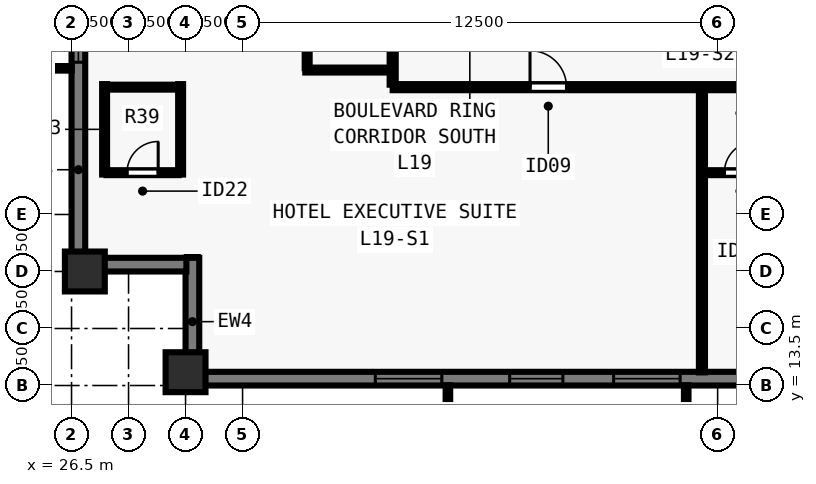
"""IFC4 building model, lengths in metres.
Left out: names, types, materials, properties, quantities, classifications, styles, units other than length and angle.
Written with IfcOpenShell. Run it as: python <this file> out.ifc"""

import sys

from ifc_helpers import new_model, si_unit, direction, frame, frame_2d, origin, origin_2d, place, context, subcontext, project, spatial, rectangle, extrude, element, fill, save


model = new_model("IFC4")
c1 = context("Model", 3, precision=1e-05, world=origin(), true_north=direction((0.0, 1.0)))
c2 = subcontext(c1, "Body", "Model", "MODEL_VIEW")
j1 = project(units=[si_unit("LENGTHUNIT", "METRE"), si_unit("PLANEANGLEUNIT", "RADIAN")], contexts=[c1])
p1 = place(None, origin())
s1 = spatial("IfcSite", under=j1, at=p1, CompositionType="ELEMENT")
p2 = place(p1, origin())
s2 = spatial("IfcBuilding", under=s1, at=p2, CompositionType="ELEMENT")
p3 = place(p2, frame((0.0, 0.0, 72.5)))
s3 = spatial("IfcBuildingStorey", under=s2, at=p3, CompositionType="ELEMENT", Elevation=72.5)
for number, where, z_axis, x_axis in (
    (1, (29.5, 13.85, 0.0), (0.0, 0.0, 1.0), (1.0, 0.0, 0.0)),
    (2, (26.85, 16.5, 0.0), (0.0, 0.0, 1.0), (0.0, 1.0, 0.0)),
):
    element("IfcColumn", number, at=place(p3, frame(where, z_axis=z_axis, x_axis=x_axis)), inside=s3, PredefinedType="COLUMN", context=c2, shape_type="SweptSolid", body=[
        extrude(rectangle(XDim=1.05, YDim=1.05, at=origin_2d()), origin(), (0.0, 0.0, 1.0), 3.5),
    ])
p4 = place(p3, frame((74.5, 13.68, 0.0), z_axis=(0.0, 0.0, 1.0), x_axis=(-1.0, 0.0, 0.0)))
e3 = element("IfcWall", 3, at=p4, inside=s3, PredefinedType="SOLIDWALL", context=c2, shape_type="SweptSolid", body=[
    extrude(rectangle(XDim=44.662, YDim=0.36, at=frame_2d((22.331, 0.0))), origin(), (0.0, 0.0, 1.0), 3.28),
])
p5 = place(p4, frame((4.655, 0.0, 0.8)))
e4 = element("IfcOpeningElement", 4, at=p5, cuts=e3, PredefinedType="OPENING", context=c2, shape_type="SweptSolid", body=[
    extrude(rectangle(XDim=1.75, YDim=1.544, at=frame_2d((0.875, 0.772))), frame((0.0, 0.19, 0.0), z_axis=(0.0, -1.0, 0.0), x_axis=(1.0, 0.0, 0.0)), (0.0, 0.0, 1.0), 0.38),
])
p6 = place(p4, frame((8.19, 0.0, 0.8)))
e5 = element("IfcOpeningElement", 5, at=p6, cuts=e3, PredefinedType="OPENING", context=c2, shape_type="SweptSolid", body=[
    extrude(rectangle(XDim=1.4, YDim=1.544, at=frame_2d((0.7, 0.772))), frame((0.0, 0.19, 0.0), z_axis=(0.0, -1.0, 0.0), x_axis=(1.0, 0.0, 0.0)), (0.0, 0.0, 1.0), 0.38),
])
p7 = place(p4, frame((11.375, 0.0, 0.8)))
e6 = element("IfcOpeningElement", 6, at=p7, cuts=e3, PredefinedType="OPENING", context=c2, shape_type="SweptSolid", body=[
    extrude(rectangle(XDim=1.75, YDim=1.544, at=frame_2d((0.875, 0.772))), frame((0.0, 0.19, 0.0), z_axis=(0.0, -1.0, 0.0), x_axis=(1.0, 0.0, 0.0)), (0.0, 0.0, 1.0), 0.38),
])
p8 = place(p4, frame((14.911, 0.0, 0.8)))
e7 = element("IfcOpeningElement", 7, at=p8, cuts=e3, PredefinedType="OPENING", context=c2, shape_type="SweptSolid", body=[
    extrude(rectangle(XDim=1.4, YDim=1.544, at=frame_2d((0.7, 0.772))), frame((0.0, 0.19, 0.0), z_axis=(0.0, -1.0, 0.0), x_axis=(1.0, 0.0, 0.0)), (0.0, 0.0, 1.0), 0.38),
])
p9 = place(p4, frame((18.546, 0.0, 0.8)))
e8 = element("IfcOpeningElement", 8, at=p9, cuts=e3, PredefinedType="OPENING", context=c2, shape_type="SweptSolid", body=[
    extrude(rectangle(XDim=1.75, YDim=1.544, at=frame_2d((0.875, 0.772))), frame((0.0, 0.19, 0.0), z_axis=(0.0, -1.0, 0.0), x_axis=(1.0, 0.0, 0.0)), (0.0, 0.0, 1.0), 0.38),
])
p10 = place(p4, frame((21.631, 0.0, 0.8)))
e9 = element("IfcOpeningElement", 9, at=p10, cuts=e3, PredefinedType="OPENING", context=c2, shape_type="SweptSolid", body=[
    extrude(rectangle(XDim=1.4, YDim=1.544, at=frame_2d((0.7, 0.772))), frame((0.0, 0.19, 0.0), z_axis=(0.0, -1.0, 0.0), x_axis=(1.0, 0.0, 0.0)), (0.0, 0.0, 1.0), 0.38),
])
p11 = place(p4, frame((24.366, 0.0, 0.8)))
e10 = element("IfcOpeningElement", 10, at=p11, cuts=e3, PredefinedType="OPENING", context=c2, shape_type="SweptSolid", body=[
    extrude(rectangle(XDim=1.75, YDim=1.544, at=frame_2d((0.875, 0.772))), frame((0.0, 0.19, 0.0), z_axis=(0.0, -1.0, 0.0), x_axis=(1.0, 0.0, 0.0)), (0.0, 0.0, 1.0), 0.38),
])
p12 = place(p4, frame((28.351, 0.0, 0.8)))
e11 = element("IfcOpeningElement", 11, at=p12, cuts=e3, PredefinedType="OPENING", context=c2, shape_type="SweptSolid", body=[
    extrude(rectangle(XDim=1.4, YDim=1.544, at=frame_2d((0.7, 0.772))), frame((0.0, 0.19, 0.0), z_axis=(0.0, -1.0, 0.0), x_axis=(1.0, 0.0, 0.0)), (0.0, 0.0, 1.0), 0.38),
])
p13 = place(p4, frame((31.987, 0.0, 0.8)))
e12 = element("IfcOpeningElement", 12, at=p13, cuts=e3, PredefinedType="OPENING", context=c2, shape_type="SweptSolid", body=[
    extrude(rectangle(XDim=1.75, YDim=1.544, at=frame_2d((0.875, 0.772))), frame((0.0, 0.19, 0.0), z_axis=(0.0, -1.0, 0.0), x_axis=(1.0, 0.0, 0.0)), (0.0, 0.0, 1.0), 0.38),
])
p14 = place(p4, frame((35.072, 0.0, 0.8)))
e13 = element("IfcOpeningElement", 13, at=p14, cuts=e3, PredefinedType="OPENING", context=c2, shape_type="SweptSolid", body=[
    extrude(rectangle(XDim=1.4, YDim=1.544, at=frame_2d((0.7, 0.772))), frame((0.0, 0.19, 0.0), z_axis=(0.0, -1.0, 0.0), x_axis=(1.0, 0.0, 0.0)), (0.0, 0.0, 1.0), 0.38),
])
p15 = place(p4, frame((38.257, 0.0, 0.8)))
e14 = element("IfcOpeningElement", 14, at=p15, cuts=e3, PredefinedType="OPENING", context=c2, shape_type="SweptSolid", body=[
    extrude(rectangle(XDim=1.75, YDim=1.544, at=frame_2d((0.875, 0.772))), frame((0.0, 0.19, 0.0), z_axis=(0.0, -1.0, 0.0), x_axis=(1.0, 0.0, 0.0)), (0.0, 0.0, 1.0), 0.38),
])
p16 = place(p3, frame((29.68, 13.5, 0.0), z_axis=(0.0, 0.0, 1.0), x_axis=(0.0, 1.0, 0.0)))
e15 = element("IfcWall", 15, at=p16, inside=s3, PredefinedType="SOLIDWALL", context=c2, shape_type="SweptSolid", body=[
    extrude(rectangle(XDim=3.36, YDim=0.36, at=frame_2d((1.68, 0.0))), origin(), (0.0, 0.0, 1.0), 3.28),
])
p17 = place(p3, frame((29.522, 16.68, 0.0), z_axis=(0.0, 0.0, 1.0), x_axis=(-1.0, 0.0, 0.0)))
e16 = element("IfcWall", 16, at=p17, inside=s3, PredefinedType="SOLIDWALL", context=c2, shape_type="SweptSolid", body=[
    extrude(rectangle(XDim=2.684, YDim=0.36, at=frame_2d((1.342, 0.0))), origin(), (0.0, 0.0, 1.0), 3.28),
])
p18 = place(p3, frame((26.68, 16.5, 0.0), z_axis=(0.0, 0.0, 1.0), x_axis=(0.0, 1.0, 0.0)))
e17 = element("IfcWall", 17, at=p18, inside=s3, PredefinedType="SOLIDWALL", context=c2, shape_type="SweptSolid", body=[
    extrude(rectangle(XDim=44.662, YDim=0.36, at=frame_2d((22.331, 0.0))), origin(), (0.0, 0.0, 1.0), 3.28),
])
p19 = place(p18, frame((5.505, 0.0, 0.8)))
e18 = element("IfcOpeningElement", 18, at=p19, cuts=e17, PredefinedType="OPENING", context=c2, shape_type="SweptSolid", body=[
    extrude(rectangle(XDim=1.75, YDim=1.544, at=frame_2d((0.875, 0.772))), frame((0.0, 0.19, 0.0), z_axis=(0.0, -1.0, 0.0), x_axis=(1.0, 0.0, 0.0)), (0.0, 0.0, 1.0), 0.38),
])
p20 = place(p18, frame((8.19, 0.0, 0.8)))
e19 = element("IfcOpeningElement", 19, at=p20, cuts=e17, PredefinedType="OPENING", context=c2, shape_type="SweptSolid", body=[
    extrude(rectangle(XDim=1.4, YDim=1.544, at=frame_2d((0.7, 0.772))), frame((0.0, 0.19, 0.0), z_axis=(0.0, -1.0, 0.0), x_axis=(1.0, 0.0, 0.0)), (0.0, 0.0, 1.0), 0.38),
])
p21 = place(p18, frame((11.375, 0.0, 0.8)))
e20 = element("IfcOpeningElement", 20, at=p21, cuts=e17, PredefinedType="OPENING", context=c2, shape_type="SweptSolid", body=[
    extrude(rectangle(XDim=1.75, YDim=1.544, at=frame_2d((0.875, 0.772))), frame((0.0, 0.19, 0.0), z_axis=(0.0, -1.0, 0.0), x_axis=(1.0, 0.0, 0.0)), (0.0, 0.0, 1.0), 0.38),
])
p22 = place(p18, frame((14.911, 0.0, 0.8)))
e21 = element("IfcOpeningElement", 21, at=p22, cuts=e17, PredefinedType="OPENING", context=c2, shape_type="SweptSolid", body=[
    extrude(rectangle(XDim=1.4, YDim=1.544, at=frame_2d((0.7, 0.772))), frame((0.0, 0.19, 0.0), z_axis=(0.0, -1.0, 0.0), x_axis=(1.0, 0.0, 0.0)), (0.0, 0.0, 1.0), 0.38),
])
p23 = place(p18, frame((18.546, 0.0, 0.8)))
e22 = element("IfcOpeningElement", 22, at=p23, cuts=e17, PredefinedType="OPENING", context=c2, shape_type="SweptSolid", body=[
    extrude(rectangle(XDim=1.75, YDim=1.544, at=frame_2d((0.875, 0.772))), frame((0.0, 0.19, 0.0), z_axis=(0.0, -1.0, 0.0), x_axis=(1.0, 0.0, 0.0)), (0.0, 0.0, 1.0), 0.38),
])
p24 = place(p18, frame((22.481, 0.0, 0.8)))
e23 = element("IfcOpeningElement", 23, at=p24, cuts=e17, PredefinedType="OPENING", context=c2, shape_type="SweptSolid", body=[
    extrude(rectangle(XDim=1.4, YDim=1.544, at=frame_2d((0.7, 0.772))), frame((0.0, 0.19, 0.0), z_axis=(0.0, -1.0, 0.0), x_axis=(1.0, 0.0, 0.0)), (0.0, 0.0, 1.0), 0.38),
])
p25 = place(p18, frame((24.366, 0.0, 0.8)))
e24 = element("IfcOpeningElement", 24, at=p25, cuts=e17, PredefinedType="OPENING", context=c2, shape_type="SweptSolid", body=[
    extrude(rectangle(XDim=1.75, YDim=1.544, at=frame_2d((0.875, 0.772))), frame((0.0, 0.19, 0.0), z_axis=(0.0, -1.0, 0.0), x_axis=(1.0, 0.0, 0.0)), (0.0, 0.0, 1.0), 0.38),
])
p26 = place(p18, frame((28.351, 0.0, 0.8)))
e25 = element("IfcOpeningElement", 25, at=p26, cuts=e17, PredefinedType="OPENING", context=c2, shape_type="SweptSolid", body=[
    extrude(rectangle(XDim=1.4, YDim=1.544, at=frame_2d((0.7, 0.772))), frame((0.0, 0.19, 0.0), z_axis=(0.0, -1.0, 0.0), x_axis=(1.0, 0.0, 0.0)), (0.0, 0.0, 1.0), 0.38),
])
p27 = place(p18, frame((31.537, 0.0, 0.8)))
e26 = element("IfcOpeningElement", 26, at=p27, cuts=e17, PredefinedType="OPENING", context=c2, shape_type="SweptSolid", body=[
    extrude(rectangle(XDim=1.75, YDim=1.544, at=frame_2d((0.875, 0.772))), frame((0.0, 0.19, 0.0), z_axis=(0.0, -1.0, 0.0), x_axis=(1.0, 0.0, 0.0)), (0.0, 0.0, 1.0), 0.38),
])
p28 = place(p18, frame((35.072, 0.0, 0.8)))
e27 = element("IfcOpeningElement", 27, at=p28, cuts=e17, PredefinedType="OPENING", context=c2, shape_type="SweptSolid", body=[
    extrude(rectangle(XDim=1.4, YDim=1.544, at=frame_2d((0.7, 0.772))), frame((0.0, 0.19, 0.0), z_axis=(0.0, -1.0, 0.0), x_axis=(1.0, 0.0, 0.0)), (0.0, 0.0, 1.0), 0.38),
])
p29 = place(p18, frame((37.807, 0.0, 0.8)))
e28 = element("IfcOpeningElement", 28, at=p29, cuts=e17, PredefinedType="OPENING", context=c2, shape_type="SweptSolid", body=[
    extrude(rectangle(XDim=1.75, YDim=1.544, at=frame_2d((0.875, 0.772))), frame((0.0, 0.19, 0.0), z_axis=(0.0, -1.0, 0.0), x_axis=(1.0, 0.0, 0.0)), (0.0, 0.0, 1.0), 0.38),
])
p30 = place(p3, frame((34.95, 21.35, 0.0), z_axis=(0.0, 0.0, 1.0), x_axis=(1.0, 0.0, 0.0)))
e29 = element("IfcWall", 29, at=p30, inside=s3, PredefinedType="PARTITIONING", context=c2, shape_type="SweptSolid", body=[
    extrude(rectangle(XDim=34.1, YDim=0.16, at=frame_2d((17.05, 0.0))), origin(), (0.0, 0.0, 1.0), 3.28),
])
p31 = place(p30, frame((3.614, 0.0, 0.0)))
e30 = element("IfcOpeningElement", 30, at=p31, cuts=e29, PredefinedType="OPENING", context=c2, shape_type="SweptSolid", body=[
    extrude(rectangle(XDim=0.96, YDim=2.15, at=frame_2d((0.48, 1.075))), frame((0.0, 0.09, 0.0), z_axis=(0.0, -1.0, 0.0), x_axis=(1.0, 0.0, 0.0)), (0.0, 0.0, 1.0), 0.18),
])
p32 = place(p30, frame((17.56, 0.0, 0.0)))
e31 = element("IfcOpeningElement", 31, at=p32, cuts=e29, PredefinedType="OPENING", context=c2, shape_type="SweptSolid", body=[
    extrude(rectangle(XDim=0.96, YDim=2.15, at=frame_2d((0.48, 1.075))), frame((0.0, 0.09, 0.0), z_axis=(0.0, -1.0, 0.0), x_axis=(1.0, 0.0, 0.0)), (0.0, 0.0, 1.0), 0.18),
])
p33 = place(p30, frame((30.516, 0.0, 0.0)))
e32 = element("IfcOpeningElement", 32, at=p33, cuts=e29, PredefinedType="OPENING", context=c2, shape_type="SweptSolid", body=[
    extrude(rectangle(XDim=0.96, YDim=2.15, at=frame_2d((0.48, 1.075))), frame((0.0, 0.09, 0.0), z_axis=(0.0, -1.0, 0.0), x_axis=(1.0, 0.0, 0.0)), (0.0, 0.0, 1.0), 0.18),
])
p34 = place(p3, frame((34.95, 21.415, 0.0), z_axis=(0.0, 0.0, 1.0), x_axis=(0.0, 1.0, 0.0)))
e33 = element("IfcWall", 33, at=p34, inside=s3, PredefinedType="PARTITIONING", context=c2, shape_type="SweptSolid", body=[
    extrude(rectangle(XDim=35.17, YDim=0.16, at=frame_2d((17.585, 0.0))), origin(), (0.0, 0.0, 1.0), 3.28),
])
p35 = place(p34, frame((9.414, 0.0, 0.0)))
e34 = element("IfcOpeningElement", 34, at=p35, cuts=e33, PredefinedType="OPENING", context=c2, shape_type="SweptSolid", body=[
    extrude(rectangle(XDim=0.96, YDim=2.15, at=frame_2d((0.48, 1.075))), frame((0.0, 0.09, 0.0), z_axis=(0.0, -1.0, 0.0), x_axis=(1.0, 0.0, 0.0)), (0.0, 0.0, 1.0), 0.18),
])
p36 = place(p34, frame((26.814, 0.0, 0.0)))
e35 = element("IfcOpeningElement", 35, at=p36, cuts=e33, PredefinedType="OPENING", context=c2, shape_type="SweptSolid", body=[
    extrude(rectangle(XDim=0.96, YDim=2.15, at=frame_2d((0.48, 1.075))), frame((0.0, 0.09, 0.0), z_axis=(0.0, -1.0, 0.0), x_axis=(1.0, 0.0, 0.0)), (0.0, 0.0, 1.0), 0.18),
])
for number, where, z_axis, x_axis in (
    (36, (27.37, 19.05, 0.0), (0.0, 0.0, 1.0), (0.0, 1.0, 0.0)),
    (37, (29.37, 19.05, 0.0), (0.0, 0.0, 1.0), (0.0, 1.0, 0.0)),
):
    element("IfcWall", number, at=place(p3, frame(where, z_axis=z_axis, x_axis=x_axis)), inside=s3, PredefinedType="PLUMBINGWALL", context=c2, shape_type="SweptSolid", body=[
        extrude(rectangle(XDim=2.38, YDim=0.13, at=frame_2d((1.19, 0.0))), origin(), (0.0, 0.0, 1.0), 3.28),
    ])
p37 = place(p3, frame((27.42, 19.1, 0.0), z_axis=(0.0, 0.0, 1.0), x_axis=(1.0, 0.0, 0.0)))
e38 = element("IfcWall", 38, at=p37, inside=s3, PredefinedType="PLUMBINGWALL", context=c2, shape_type="SweptSolid", body=[
    extrude(rectangle(XDim=1.9, YDim=0.13, at=frame_2d((0.95, 0.0))), origin(), (0.0, 0.0, 1.0), 3.28),
])
p38 = place(p37, frame((0.54, 0.0, 0.0)))
e39 = element("IfcOpeningElement", 39, at=p38, cuts=e38, PredefinedType="OPENING", context=c2, shape_type="SweptSolid", body=[
    extrude(rectangle(XDim=0.82, YDim=2.1, at=frame_2d((0.41, 1.05))), frame((0.0, 0.075, 0.0), z_axis=(0.0, -1.0, 0.0), x_axis=(1.0, 0.0, 0.0)), (0.0, 0.0, 1.0), 0.15),
])
p39 = place(p3, frame((27.42, 21.35, 0.0), z_axis=(0.0, 0.0, 1.0), x_axis=(1.0, 0.0, 0.0)))
e40 = element("IfcWall", 40, at=p39, inside=s3, PredefinedType="PLUMBINGWALL", context=c2, shape_type="SweptSolid", body=[
    extrude(rectangle(XDim=1.9, YDim=0.13, at=frame_2d((0.95, 0.0))), origin(), (0.0, 0.0, 1.0), 3.28),
])
p40 = place(p3, frame((43.087, 13.845, 0.0), z_axis=(0.0, 0.0, 1.0), x_axis=(0.0, 1.0, 0.0)))
e41 = element("IfcWall", 41, at=p40, inside=s3, PredefinedType="PARTITIONING", context=c2, shape_type="SweptSolid", body=[
    extrude(rectangle(XDim=7.44, YDim=0.16, at=frame_2d((3.72, 0.0))), origin(), (0.0, 0.0, 1.0), 3.28),
])
p41 = place(p3, frame((43.153, 19.1, 0.0), z_axis=(0.0, 0.0, 1.0), x_axis=(1.0, 0.0, 0.0)))
e42 = element("IfcWall", 42, at=p41, inside=s3, PredefinedType="PLUMBINGWALL", context=c2, shape_type="SweptSolid", body=[
    extrude(rectangle(XDim=1.885, YDim=0.13, at=frame_2d((0.942, 0.0))), origin(), (0.0, 0.0, 1.0), 3.28),
])
p42 = place(p41, frame((0.525, 0.0, 0.0)))
e43 = element("IfcOpeningElement", 43, at=p42, cuts=e42, PredefinedType="OPENING", context=c2, shape_type="SweptSolid", body=[
    extrude(rectangle(XDim=0.82, YDim=2.1, at=frame_2d((0.41, 1.05))), frame((0.0, 0.075, 0.0), z_axis=(0.0, -1.0, 0.0), x_axis=(1.0, 0.0, 0.0)), (0.0, 0.0, 1.0), 0.15),
])
p43 = place(p3, frame((32.65, 21.8, 0.0), z_axis=(0.0, 0.0, 1.0), x_axis=(1.0, 0.0, 0.0)))
e44 = element("IfcWall", 44, at=p43, inside=s3, PredefinedType="PLUMBINGWALL", context=c2, shape_type="SweptSolid", body=[
    extrude(rectangle(XDim=2.235, YDim=0.13, at=frame_2d((1.118, 0.0))), origin(), (0.0, 0.0, 1.0), 2.849),
])
p44 = place(p3, frame((32.7, 21.85, 0.0), z_axis=(0.0, 0.0, 1.0), x_axis=(0.0, 1.0, 0.0)))
e45 = element("IfcWall", 45, at=p44, inside=s3, PredefinedType="PLUMBINGWALL", context=c2, shape_type="SweptSolid", body=[
    extrude(rectangle(XDim=1.9, YDim=0.13, at=frame_2d((0.95, 0.0))), origin(), (0.0, 0.0, 1.0), 3.28),
])
p45 = place(p44, frame((0.54, 0.0, 0.0)))
e46 = element("IfcOpeningElement", 46, at=p45, cuts=e45, PredefinedType="OPENING", context=c2, shape_type="SweptSolid", body=[
    extrude(rectangle(XDim=0.82, YDim=2.1, at=frame_2d((0.41, 1.05))), frame((0.0, 0.075, 0.0), z_axis=(0.0, -1.0, 0.0), x_axis=(1.0, 0.0, 0.0)), (0.0, 0.0, 1.0), 0.15),
])
p46 = place(p13, origin())
e47 = element("IfcWindow", 47, at=p46, inside=s3, PartitioningType="SINGLE_PANEL", PredefinedType="WINDOW", context=c2, shape_type="SweptSolid", body=[
    extrude(rectangle(XDim=1.75, YDim=1.544, at=frame_2d((0.875, 0.772))), frame((0.0, -0.05, 0.0), z_axis=(0.0, -1.0, 0.0), x_axis=(1.0, 0.0, 0.0)), (0.0, 0.0, 1.0), 0.06),
])
fill(e12, e47)
p47 = place(p14, origin())
e48 = element("IfcWindow", 48, at=p47, inside=s3, PartitioningType="SINGLE_PANEL", PredefinedType="WINDOW", context=c2, shape_type="SweptSolid", body=[
    extrude(rectangle(XDim=1.4, YDim=1.544, at=frame_2d((0.7, 0.772))), frame((0.0, -0.05, 0.0), z_axis=(0.0, -1.0, 0.0), x_axis=(1.0, 0.0, 0.0)), (0.0, 0.0, 1.0), 0.06),
])
fill(e13, e48)
p48 = place(p15, origin())
e49 = element("IfcWindow", 49, at=p48, inside=s3, PartitioningType="SINGLE_PANEL", PredefinedType="WINDOW", context=c2, shape_type="SweptSolid", body=[
    extrude(rectangle(XDim=1.75, YDim=1.544, at=frame_2d((0.875, 0.772))), frame((0.0, -0.05, 0.0), z_axis=(0.0, -1.0, 0.0), x_axis=(1.0, 0.0, 0.0)), (0.0, 0.0, 1.0), 0.06),
])
fill(e14, e49)
p49 = place(p19, origin())
e50 = element("IfcWindow", 50, at=p49, inside=s3, PartitioningType="SINGLE_PANEL", PredefinedType="WINDOW", context=c2, shape_type="SweptSolid", body=[
    extrude(rectangle(XDim=1.75, YDim=1.544, at=frame_2d((0.875, 0.772))), frame((0.0, -0.05, 0.0), z_axis=(0.0, -1.0, 0.0), x_axis=(1.0, 0.0, 0.0)), (0.0, 0.0, 1.0), 0.06),
])
fill(e18, e50)
p50 = place(p38, origin())
e51 = element("IfcDoor", 51, at=p50, inside=s3, OperationType="SINGLE_SWING_RIGHT", PredefinedType="DOOR", context=c2, shape_type="SweptSolid", body=[
    extrude(rectangle(XDim=0.82, YDim=2.1, at=frame_2d((0.41, 1.05))), frame((0.0, 0.025, 0.0), z_axis=(0.0, -1.0, 0.0), x_axis=(1.0, 0.0, 0.0)), (0.0, 0.0, 1.0), 0.05),
])
fill(e39, e51)
p51 = place(p31, origin())
e52 = element("IfcDoor", 52, at=p51, inside=s3, OperationType="SINGLE_SWING_LEFT", PredefinedType="DOOR", context=c2, shape_type="SweptSolid", body=[
    extrude(rectangle(XDim=0.96, YDim=2.15, at=frame_2d((0.48, 1.075))), frame((0.0, 0.025, 0.0), z_axis=(0.0, -1.0, 0.0), x_axis=(1.0, 0.0, 0.0)), (0.0, 0.0, 1.0), 0.05),
])
fill(e30, e52)
p52 = place(p42, origin())
e53 = element("IfcDoor", 53, at=p52, inside=s3, OperationType="SINGLE_SWING_RIGHT", PredefinedType="DOOR", context=c2, shape_type="SweptSolid", body=[
    extrude(rectangle(XDim=0.82, YDim=2.1, at=frame_2d((0.41, 1.05))), frame((0.0, 0.025, 0.0), z_axis=(0.0, -1.0, 0.0), x_axis=(1.0, 0.0, 0.0)), (0.0, 0.0, 1.0), 0.05),
])
fill(e43, e53)
save(model, sys.argv[1])
